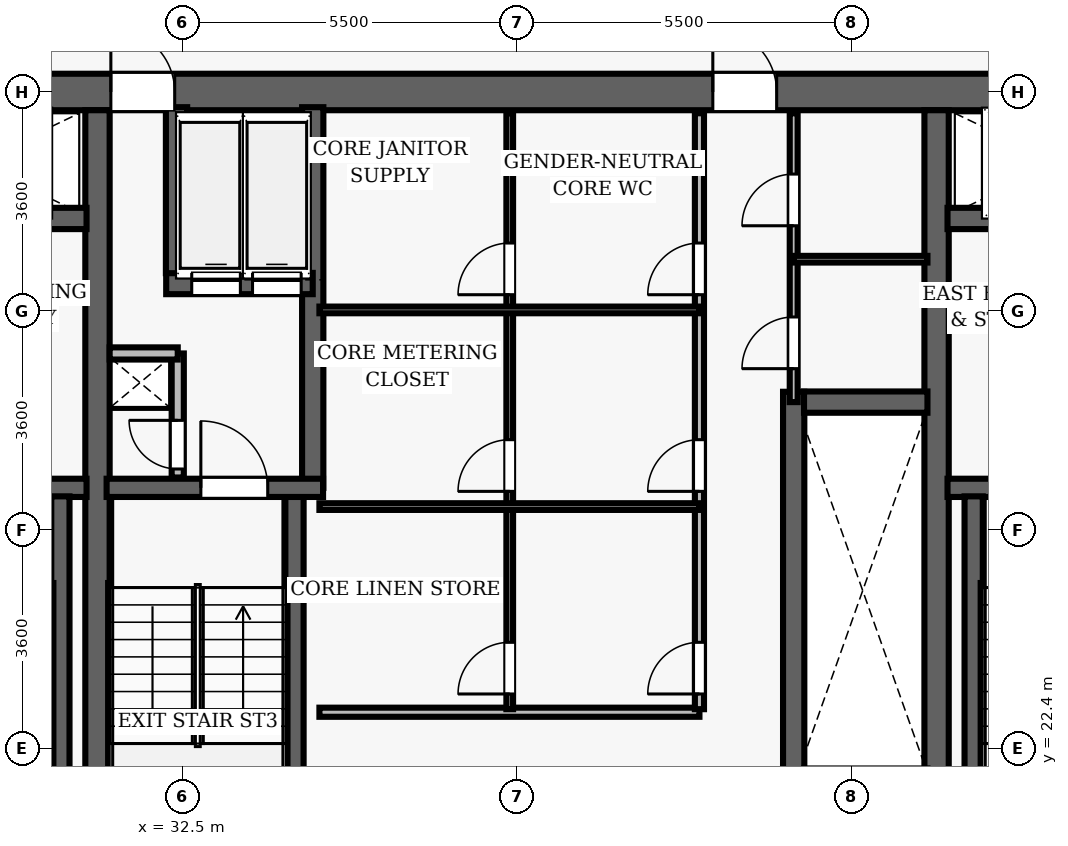
"""IFC4 building model, lengths in metres.
Left out: names, types, materials, properties, quantities, classifications, styles, units other than length and angle.
Written with IfcOpenShell. Run it as: python <this file> out.ifc"""

import sys

from ifc_helpers import new_model, si_unit, direction, frame, frame_2d, origin, place, context, subcontext, project, spatial, rectangle, extrude, element, fill, save


model = new_model("IFC4")
c1 = context("Model", 3, precision=1e-05, world=origin(), true_north=direction((0.0, 1.0)))
c2 = subcontext(c1, "Body", "Model", "MODEL_VIEW")
j1 = project(units=[si_unit("LENGTHUNIT", "METRE"), si_unit("PLANEANGLEUNIT", "RADIAN")], contexts=[c1])
p1 = place(None, origin())
s1 = spatial("IfcSite", under=j1, at=p1, CompositionType="ELEMENT")
p2 = place(p1, origin())
s2 = spatial("IfcBuilding", under=s1, at=p2, CompositionType="ELEMENT")
p3 = place(p2, frame((0.0, 0.0, 134.3)))
s3 = spatial("IfcBuildingStorey", under=s2, at=p3, CompositionType="ELEMENT", Elevation=134.3)
p4 = place(p3, frame((26.7, 33.2, 0.0), z_axis=(0.0, 0.0, 1.0), x_axis=(1.0, 0.0, 0.0)))
e1 = element("IfcWall", 1, at=p4, inside=s3, PredefinedType="SHEAR", context=c2, shape_type="SweptSolid", body=[
    extrude(rectangle(XDim=22.6, YDim=0.6, at=frame_2d((11.3, 0.0))), origin(), (0.0, 0.0, 1.0), 3.5),
])
p5 = place(p4, frame((4.62, 0.0, 0.0)))
e2 = element("IfcOpeningElement", 2, at=p5, cuts=e1, PredefinedType="OPENING", context=c2, shape_type="SweptSolid", body=[
    extrude(rectangle(XDim=1.05, YDim=2.15, at=frame_2d((0.525, 1.075))), frame((0.0, 0.31, 0.0), z_axis=(0.0, -1.0, 0.0), x_axis=(1.0, 0.0, 0.0)), (0.0, 0.0, 1.0), 0.62),
])
p6 = place(p4, frame((14.52, 0.0, 0.0)))
e3 = element("IfcOpeningElement", 3, at=p6, cuts=e1, PredefinedType="OPENING", context=c2, shape_type="SweptSolid", body=[
    extrude(rectangle(XDim=1.05, YDim=2.15, at=frame_2d((0.525, 1.075))), frame((0.0, 0.31, 0.0), z_axis=(0.0, -1.0, 0.0), x_axis=(1.0, 0.0, 0.0)), (0.0, 0.0, 1.0), 0.62),
])
for number, where, z_axis, x_axis in (
    (4, (31.1, 19.1, 0.0), (0.0, 0.0, 1.0), (0.0, 1.0, 0.0)),
    (5, (44.9, 19.1, 0.0), (0.0, 0.0, 1.0), (0.0, 1.0, 0.0)),
):
    element("IfcWall", number, at=place(p3, frame(where, z_axis=z_axis, x_axis=x_axis)), inside=s3, PredefinedType="SHEAR", context=c2, shape_type="SweptSolid", body=[
        extrude(rectangle(XDim=13.8, YDim=0.4, at=frame_2d((6.9, 0.0))), origin(), (0.0, 0.0, 1.0), 3.5),
    ])
p7 = place(p3, frame((27.25, 26.69, 0.0), z_axis=(0.0, 0.0, 1.0), x_axis=(1.0, 0.0, 0.0)))
e6 = element("IfcWall", 6, at=p7, inside=s3, PredefinedType="SHEAR", context=c2, shape_type="SweptSolid", body=[
    extrude(rectangle(XDim=3.67, YDim=0.3, at=frame_2d((1.835, 0.0))), origin(), (0.0, 0.0, 1.0), 3.5),
])
p8 = place(p7, frame((1.05, 0.0, 0.0)))
e7 = element("IfcOpeningElement", 7, at=p8, cuts=e6, PredefinedType="OPENING", context=c2, shape_type="SweptSolid", body=[
    extrude(rectangle(XDim=1.1, YDim=2.15, at=frame_2d((0.55, 1.075))), frame((0.0, 0.16, 0.0), z_axis=(0.0, -1.0, 0.0), x_axis=(1.0, 0.0, 0.0)), (0.0, 0.0, 1.0), 0.32),
])
p9 = place(p3, frame((30.49, 19.05, 0.0), z_axis=(0.0, 0.0, 1.0), x_axis=(0.0, 1.0, 0.0)))
e8 = element("IfcWall", 8, at=p9, inside=s3, PredefinedType="SHEAR", context=c2, shape_type="SweptSolid", body=[
    extrude(rectangle(XDim=7.5, YDim=0.3, at=frame_2d((3.75, 0.0))), origin(), (0.0, 0.0, 1.0), 3.5),
])
p10 = place(p3, frame((27.25, 31.12, 0.0), z_axis=(0.0, 0.0, 1.0), x_axis=(1.0, 0.0, 0.0)))
e9 = element("IfcWall", 9, at=p10, inside=s3, PredefinedType="SHEAR", context=c2, shape_type="SweptSolid", body=[
    extrude(rectangle(XDim=3.67, YDim=0.35, at=frame_2d((1.835, 0.0))), origin(), (0.0, 0.0, 1.0), 2.675),
])
p11 = place(p10, frame((1.25, 0.0, 0.0)))
e10 = element("IfcOpeningElement", 10, at=p11, cuts=e9, PredefinedType="OPENING", context=c2, shape_type="SweptSolid", body=[
    extrude(rectangle(XDim=1.1, YDim=2.15, at=frame_2d((0.55, 1.075))), frame((0.0, 0.185, 0.0), z_axis=(0.0, -1.0, 0.0), x_axis=(1.0, 0.0, 0.0)), (0.0, 0.0, 1.0), 0.37),
])
p12 = place(p3, frame((45.08, 26.69, 0.0), z_axis=(0.0, 0.0, 1.0), x_axis=(1.0, 0.0, 0.0)))
e11 = element("IfcWall", 11, at=p12, inside=s3, PredefinedType="SHEAR", context=c2, shape_type="SweptSolid", body=[
    extrude(rectangle(XDim=3.67, YDim=0.3, at=frame_2d((1.835, 0.0))), origin(), (0.0, 0.0, 1.0), 3.5),
])
p13 = place(p12, frame((1.05, 0.0, 0.0)))
e12 = element("IfcOpeningElement", 12, at=p13, cuts=e11, PredefinedType="OPENING", context=c2, shape_type="SweptSolid", body=[
    extrude(rectangle(XDim=1.1, YDim=2.15, at=frame_2d((0.55, 1.075))), frame((0.0, 0.16, 0.0), z_axis=(0.0, -1.0, 0.0), x_axis=(1.0, 0.0, 0.0)), (0.0, 0.0, 1.0), 0.32),
])
p14 = place(p3, frame((45.51, 19.05, 0.0), z_axis=(0.0, 0.0, 1.0), x_axis=(0.0, 1.0, 0.0)))
e13 = element("IfcWall", 13, at=p14, inside=s3, PredefinedType="SHEAR", context=c2, shape_type="SweptSolid", body=[
    extrude(rectangle(XDim=7.5, YDim=0.3, at=frame_2d((3.75, 0.0))), origin(), (0.0, 0.0, 1.0), 3.5),
])
p15 = place(p3, frame((45.08, 31.12, 0.0), z_axis=(0.0, 0.0, 1.0), x_axis=(1.0, 0.0, 0.0)))
e14 = element("IfcWall", 14, at=p15, inside=s3, PredefinedType="SHEAR", context=c2, shape_type="SweptSolid", body=[
    extrude(rectangle(XDim=3.67, YDim=0.35, at=frame_2d((1.835, 0.0))), origin(), (0.0, 0.0, 1.0), 2.675),
])
p16 = place(p15, frame((1.25, 0.0, 0.0)))
e15 = element("IfcOpeningElement", 15, at=p16, cuts=e14, PredefinedType="OPENING", context=c2, shape_type="SweptSolid", body=[
    extrude(rectangle(XDim=1.1, YDim=2.15, at=frame_2d((0.55, 1.075))), frame((0.0, 0.185, 0.0), z_axis=(0.0, -1.0, 0.0), x_axis=(1.0, 0.0, 0.0)), (0.0, 0.0, 1.0), 0.37),
])
p17 = place(p3, frame((34.34, 19.05, 0.0), z_axis=(0.0, 0.0, 1.0), x_axis=(0.0, 1.0, 0.0)))
e16 = element("IfcWall", 16, at=p17, inside=s3, PredefinedType="SHEAR", context=c2, shape_type="SweptSolid", body=[
    extrude(rectangle(XDim=7.5, YDim=0.3, at=frame_2d((3.75, 0.0))), origin(), (0.0, 0.0, 1.0), 3.5),
])
p18 = place(p3, frame((34.64, 26.69, 0.0), z_axis=(0.0, 0.0, 1.0), x_axis=(0.0, 1.0, 0.0)))
e17 = element("IfcWall", 17, at=p18, inside=s3, PredefinedType="SHEAR", context=c2, shape_type="SweptSolid", body=[
    extrude(rectangle(XDim=6.26, YDim=0.35, at=frame_2d((3.13, 0.0))), origin(), (0.0, 0.0, 1.0), 3.5),
])
p19 = place(p3, frame((31.25, 26.69, 0.0), z_axis=(0.0, 0.0, 1.0), x_axis=(1.0, 0.0, 0.0)))
e18 = element("IfcWall", 18, at=p19, inside=s3, PredefinedType="SHEAR", context=c2, shape_type="SweptSolid", body=[
    extrude(rectangle(XDim=3.56, YDim=0.3, at=frame_2d((1.78, 0.0))), origin(), (0.0, 0.0, 1.0), 3.5),
])
p20 = place(p19, frame((1.55, 0.0, 0.0)))
e19 = element("IfcOpeningElement", 19, at=p20, cuts=e18, PredefinedType="OPENING", context=c2, shape_type="SweptSolid", body=[
    extrude(rectangle(XDim=1.1, YDim=2.15, at=frame_2d((0.55, 1.075))), frame((0.0, 0.16, 0.0), z_axis=(0.0, -1.0, 0.0), x_axis=(1.0, 0.0, 0.0)), (0.0, 0.0, 1.0), 0.32),
])
p21 = place(p3, frame((32.23, 30.05, 0.0), z_axis=(0.0, 0.0, 1.0), x_axis=(1.0, 0.0, 0.0)))
e20 = element("IfcWall", 20, at=p21, inside=s3, PredefinedType="SHEAR", context=c2, shape_type="SweptSolid", body=[
    extrude(rectangle(XDim=2.41, YDim=0.35, at=frame_2d((1.205, 0.0))), origin(), (0.0, 0.0, 1.0), 2.675),
])
p22 = place(p21, frame((0.42, 0.0, 0.0)))
e21 = element("IfcOpeningElement", 21, at=p22, cuts=e20, PredefinedType="OPENING", context=c2, shape_type="SweptSolid", body=[
    extrude(rectangle(XDim=0.8, YDim=2.15, at=frame_2d((0.4, 1.075))), frame((0.0, 0.185, 0.0), z_axis=(0.0, -1.0, 0.0), x_axis=(1.0, 0.0, 0.0)), (0.0, 0.0, 1.0), 0.37),
])
p23 = place(p21, frame((1.42, 0.0, 0.0)))
e22 = element("IfcOpeningElement", 22, at=p23, cuts=e20, PredefinedType="OPENING", context=c2, shape_type="SweptSolid", body=[
    extrude(rectangle(XDim=0.8, YDim=2.15, at=frame_2d((0.4, 1.075))), frame((0.0, 0.185, 0.0), z_axis=(0.0, -1.0, 0.0), x_axis=(1.0, 0.0, 0.0)), (0.0, 0.0, 1.0), 0.37),
])
p24 = place(p3, frame((32.4, 30.22, 0.0), z_axis=(0.0, 0.0, 1.0), x_axis=(0.0, 1.0, 0.0)))
e23 = element("IfcWall", 23, at=p24, inside=s3, PredefinedType="SHEAR", context=c2, shape_type="SweptSolid", body=[
    extrude(rectangle(XDim=2.73, YDim=0.35, at=frame_2d((1.365, 0.0))), origin(), (0.0, 0.0, 1.0), 2.675),
])
p25 = place(p3, frame((32.42, 26.86, 0.0), z_axis=(0.0, 0.0, 1.0), x_axis=(0.0, 1.0, 0.0)))
e24 = element("IfcWall", 24, at=p25, inside=s3, PredefinedType="PARTITIONING", context=c2, shape_type="SweptSolid", body=[
    extrude(rectangle(XDim=2.04, YDim=0.2, at=frame_2d((1.02, 0.0))), origin(), (0.0, 0.0, 1.0), 2.675),
])
p26 = place(p25, frame((0.14, 0.0, 0.0)))
e25 = element("IfcOpeningElement", 25, at=p26, cuts=e24, PredefinedType="OPENING", context=c2, shape_type="SweptSolid", body=[
    extrude(rectangle(XDim=0.8, YDim=2.05, at=frame_2d((0.4, 1.025))), frame((0.0, 0.11, 0.0), z_axis=(0.0, -1.0, 0.0), x_axis=(1.0, 0.0, 0.0)), (0.0, 0.0, 1.0), 0.22),
])
p27 = place(p3, frame((31.3, 28.9, 0.0), z_axis=(0.0, 0.0, 1.0), x_axis=(1.0, 0.0, 0.0)))
e26 = element("IfcWall", 26, at=p27, inside=s3, PredefinedType="PARTITIONING", context=c2, shape_type="SweptSolid", body=[
    extrude(rectangle(XDim=1.12, YDim=0.2, at=frame_2d((0.56, 0.0))), origin(), (0.0, 0.0, 1.0), 2.675),
])
p28 = place(p3, frame((42.55, 21.73, 0.0), z_axis=(0.0, 0.0, 1.0), x_axis=(0.0, 1.0, 0.0)))
e27 = element("IfcWall", 27, at=p28, inside=s3, PredefinedType="SHEAR", context=c2, shape_type="SweptSolid", body=[
    extrude(rectangle(XDim=6.54, YDim=0.35, at=frame_2d((3.27, 0.0))), origin(), (0.0, 0.0, 1.0), 2.675),
])
p29 = place(p3, frame((42.72, 28.1, 0.0), z_axis=(0.0, 0.0, 1.0), x_axis=(1.0, 0.0, 0.0)))
e28 = element("IfcWall", 28, at=p29, inside=s3, PredefinedType="SHEAR", context=c2, shape_type="SweptSolid", body=[
    extrude(rectangle(XDim=2.03, YDim=0.35, at=frame_2d((1.015, 0.0))), origin(), (0.0, 0.0, 1.0), 2.675),
])
p30 = place(p3, frame((34.75, 23.0, 0.0), z_axis=(0.0, 0.0, 1.0), x_axis=(1.0, 0.0, 0.0)))
e29 = element("IfcWall", 29, at=p30, inside=s3, PredefinedType="PARTITIONING", context=c2, shape_type="SweptSolid", body=[
    extrude(rectangle(XDim=6.25, YDim=0.15, at=frame_2d((3.125, 0.0))), origin(), (0.0, 0.0, 1.0), 2.675),
])
p31 = place(p3, frame((41.0, 23.05, 0.0), z_axis=(0.0, 0.0, 1.0), x_axis=(0.0, 1.0, 0.0)))
e30 = element("IfcWall", 30, at=p31, inside=s3, PredefinedType="PARTITIONING", context=c2, shape_type="SweptSolid", body=[
    extrude(rectangle(XDim=9.8, YDim=0.15, at=frame_2d((4.9, 0.0))), origin(), (0.0, 0.0, 1.0), 2.675),
])
p32 = place(p31, frame((0.25, 0.0, 0.0)))
e31 = element("IfcOpeningElement", 31, at=p32, cuts=e30, PredefinedType="OPENING", context=c2, shape_type="SweptSolid", body=[
    extrude(rectangle(XDim=0.85, YDim=2.1, at=frame_2d((0.425, 1.05))), frame((0.0, 0.085, 0.0), z_axis=(0.0, -1.0, 0.0), x_axis=(1.0, 0.0, 0.0)), (0.0, 0.0, 1.0), 0.17),
])
p33 = place(p31, frame((3.582, 0.0, 0.0)))
e32 = element("IfcOpeningElement", 32, at=p33, cuts=e30, PredefinedType="OPENING", context=c2, shape_type="SweptSolid", body=[
    extrude(rectangle(XDim=0.85, YDim=2.1, at=frame_2d((0.425, 1.05))), frame((0.0, 0.085, 0.0), z_axis=(0.0, -1.0, 0.0), x_axis=(1.0, 0.0, 0.0)), (0.0, 0.0, 1.0), 0.17),
])
p34 = place(p31, frame((6.816, 0.0, 0.0)))
e33 = element("IfcOpeningElement", 33, at=p34, cuts=e30, PredefinedType="OPENING", context=c2, shape_type="SweptSolid", body=[
    extrude(rectangle(XDim=0.85, YDim=2.1, at=frame_2d((0.425, 1.05))), frame((0.0, 0.085, 0.0), z_axis=(0.0, -1.0, 0.0), x_axis=(1.0, 0.0, 0.0)), (0.0, 0.0, 1.0), 0.17),
])
p35 = place(p3, frame((37.88, 23.05, 0.0), z_axis=(0.0, 0.0, 1.0), x_axis=(0.0, 1.0, 0.0)))
e34 = element("IfcWall", 34, at=p35, inside=s3, PredefinedType="PARTITIONING", context=c2, shape_type="SweptSolid", body=[
    extrude(rectangle(XDim=9.8, YDim=0.11, at=frame_2d((4.9, 0.0))), origin(), (0.0, 0.0, 1.0), 2.675),
])
p36 = place(p35, frame((0.25, 0.0, 0.0)))
e35 = element("IfcOpeningElement", 35, at=p36, cuts=e34, PredefinedType="OPENING", context=c2, shape_type="SweptSolid", body=[
    extrude(rectangle(XDim=0.85, YDim=2.1, at=frame_2d((0.425, 1.05))), frame((0.0, 0.065, 0.0), z_axis=(0.0, -1.0, 0.0), x_axis=(1.0, 0.0, 0.0)), (0.0, 0.0, 1.0), 0.13),
])
p37 = place(p35, frame((3.582, 0.0, 0.0)))
e36 = element("IfcOpeningElement", 36, at=p37, cuts=e34, PredefinedType="OPENING", context=c2, shape_type="SweptSolid", body=[
    extrude(rectangle(XDim=0.85, YDim=2.1, at=frame_2d((0.425, 1.05))), frame((0.0, 0.065, 0.0), z_axis=(0.0, -1.0, 0.0), x_axis=(1.0, 0.0, 0.0)), (0.0, 0.0, 1.0), 0.13),
])
p38 = place(p35, frame((6.816, 0.0, 0.0)))
e37 = element("IfcOpeningElement", 37, at=p38, cuts=e34, PredefinedType="OPENING", context=c2, shape_type="SweptSolid", body=[
    extrude(rectangle(XDim=0.85, YDim=2.1, at=frame_2d((0.425, 1.05))), frame((0.0, 0.065, 0.0), z_axis=(0.0, -1.0, 0.0), x_axis=(1.0, 0.0, 0.0)), (0.0, 0.0, 1.0), 0.13),
])
for number, where, z_axis, x_axis in (
    (38, (34.75, 26.382, 0.0), (0.0, 0.0, 1.0), (1.0, 0.0, 0.0)),
    (39, (34.75, 29.616, 0.0), (0.0, 0.0, 1.0), (1.0, 0.0, 0.0)),
):
    element("IfcWall", number, at=place(p3, frame(where, z_axis=z_axis, x_axis=x_axis)), inside=s3, PredefinedType="PARTITIONING", context=c2, shape_type="SweptSolid", body=[
        extrude(rectangle(XDim=6.25, YDim=0.11, at=frame_2d((3.125, 0.0))), origin(), (0.0, 0.0, 1.0), 2.675),
    ])
p39 = place(p3, frame((42.55, 28.1, 0.0), z_axis=(0.0, 0.0, 1.0), x_axis=(0.0, 1.0, 0.0)))
e40 = element("IfcWall", 40, at=p39, inside=s3, PredefinedType="PARTITIONING", context=c2, shape_type="SweptSolid", body=[
    extrude(rectangle(XDim=4.75, YDim=0.13, at=frame_2d((2.375, 0.0))), origin(), (0.0, 0.0, 1.0), 2.675),
])
p40 = place(p39, frame((0.55, 0.0, 0.0)))
e41 = element("IfcOpeningElement", 41, at=p40, cuts=e40, PredefinedType="OPENING", context=c2, shape_type="SweptSolid", body=[
    extrude(rectangle(XDim=0.85, YDim=2.1, at=frame_2d((0.425, 1.05))), frame((0.0, 0.075, 0.0), z_axis=(0.0, -1.0, 0.0), x_axis=(1.0, 0.0, 0.0)), (0.0, 0.0, 1.0), 0.15),
])
p41 = place(p39, frame((2.9, 0.0, 0.0)))
e42 = element("IfcOpeningElement", 42, at=p41, cuts=e40, PredefinedType="OPENING", context=c2, shape_type="SweptSolid", body=[
    extrude(rectangle(XDim=0.85, YDim=2.1, at=frame_2d((0.425, 1.05))), frame((0.0, 0.075, 0.0), z_axis=(0.0, -1.0, 0.0), x_axis=(1.0, 0.0, 0.0)), (0.0, 0.0, 1.0), 0.15),
])
p42 = place(p3, frame((42.55, 30.45, 0.0), z_axis=(0.0, 0.0, 1.0), x_axis=(1.0, 0.0, 0.0)))
e43 = element("IfcWall", 43, at=p42, inside=s3, PredefinedType="PARTITIONING", context=c2, shape_type="SweptSolid", body=[
    extrude(rectangle(XDim=2.2, YDim=0.11, at=frame_2d((1.1, 0.0))), origin(), (0.0, 0.0, 1.0), 2.675),
])
p43 = place(p20, origin())
e44 = element("IfcDoor", 44, at=p43, inside=s3, OperationType="SINGLE_SWING_LEFT", PredefinedType="DOOR", context=c2, shape_type="SweptSolid", body=[
    extrude(rectangle(XDim=1.1, YDim=2.15, at=frame_2d((0.55, 1.075))), frame((0.0, 0.025, 0.0), z_axis=(0.0, -1.0, 0.0), x_axis=(1.0, 0.0, 0.0)), (0.0, 0.0, 1.0), 0.05),
])
fill(e19, e44)
p44 = place(p26, origin())
e45 = element("IfcDoor", 45, at=p44, inside=s3, OperationType="SINGLE_SWING_RIGHT", PredefinedType="DOOR", context=c2, shape_type="SweptSolid", body=[
    extrude(rectangle(XDim=0.8, YDim=2.05, at=frame_2d((0.4, 1.025))), frame((0.0, 0.025, 0.0), z_axis=(0.0, -1.0, 0.0), x_axis=(1.0, 0.0, 0.0)), (0.0, 0.0, 1.0), 0.05),
])
fill(e25, e45)
p45 = place(p5, origin())
e46 = element("IfcDoor", 46, at=p45, inside=s3, OperationType="SINGLE_SWING_LEFT", PredefinedType="DOOR", context=c2, shape_type="SweptSolid", body=[
    extrude(rectangle(XDim=1.05, YDim=2.15, at=frame_2d((0.525, 1.075))), frame((0.0, 0.025, 0.0), z_axis=(0.0, -1.0, 0.0), x_axis=(1.0, 0.0, 0.0)), (0.0, 0.0, 1.0), 0.05),
])
fill(e2, e46)
p46 = place(p6, origin())
e47 = element("IfcDoor", 47, at=p46, inside=s3, OperationType="SINGLE_SWING_LEFT", PredefinedType="DOOR", context=c2, shape_type="SweptSolid", body=[
    extrude(rectangle(XDim=1.05, YDim=2.15, at=frame_2d((0.525, 1.075))), frame((0.0, 0.025, 0.0), z_axis=(0.0, -1.0, 0.0), x_axis=(1.0, 0.0, 0.0)), (0.0, 0.0, 1.0), 0.05),
])
fill(e3, e47)
p47 = place(p32, origin())
e48 = element("IfcDoor", 48, at=p47, inside=s3, OperationType="SINGLE_SWING_LEFT", PredefinedType="DOOR", context=c2, shape_type="SweptSolid", body=[
    extrude(rectangle(XDim=0.85, YDim=2.1, at=frame_2d((0.425, 1.05))), frame((0.0, 0.025, 0.0), z_axis=(0.0, -1.0, 0.0), x_axis=(1.0, 0.0, 0.0)), (0.0, 0.0, 1.0), 0.05),
])
fill(e31, e48)
p48 = place(p36, origin())
e49 = element("IfcDoor", 49, at=p48, inside=s3, OperationType="SINGLE_SWING_LEFT", PredefinedType="DOOR", context=c2, shape_type="SweptSolid", body=[
    extrude(rectangle(XDim=0.85, YDim=2.1, at=frame_2d((0.425, 1.05))), frame((0.0, 0.025, 0.0), z_axis=(0.0, -1.0, 0.0), x_axis=(1.0, 0.0, 0.0)), (0.0, 0.0, 1.0), 0.05),
])
fill(e35, e49)
p49 = place(p33, origin())
e50 = element("IfcDoor", 50, at=p49, inside=s3, OperationType="SINGLE_SWING_LEFT", PredefinedType="DOOR", context=c2, shape_type="SweptSolid", body=[
    extrude(rectangle(XDim=0.85, YDim=2.1, at=frame_2d((0.425, 1.05))), frame((0.0, 0.025, 0.0), z_axis=(0.0, -1.0, 0.0), x_axis=(1.0, 0.0, 0.0)), (0.0, 0.0, 1.0), 0.05),
])
fill(e32, e50)
p50 = place(p37, origin())
e51 = element("IfcDoor", 51, at=p50, inside=s3, OperationType="SINGLE_SWING_LEFT", PredefinedType="DOOR", context=c2, shape_type="SweptSolid", body=[
    extrude(rectangle(XDim=0.85, YDim=2.1, at=frame_2d((0.425, 1.05))), frame((0.0, 0.025, 0.0), z_axis=(0.0, -1.0, 0.0), x_axis=(1.0, 0.0, 0.0)), (0.0, 0.0, 1.0), 0.05),
])
fill(e36, e51)
p51 = place(p34, origin())
e52 = element("IfcDoor", 52, at=p51, inside=s3, OperationType="SINGLE_SWING_LEFT", PredefinedType="DOOR", context=c2, shape_type="SweptSolid", body=[
    extrude(rectangle(XDim=0.85, YDim=2.1, at=frame_2d((0.425, 1.05))), frame((0.0, 0.025, 0.0), z_axis=(0.0, -1.0, 0.0), x_axis=(1.0, 0.0, 0.0)), (0.0, 0.0, 1.0), 0.05),
])
fill(e33, e52)
p52 = place(p38, origin())
e53 = element("IfcDoor", 53, at=p52, inside=s3, OperationType="SINGLE_SWING_LEFT", PredefinedType="DOOR", context=c2, shape_type="SweptSolid", body=[
    extrude(rectangle(XDim=0.85, YDim=2.1, at=frame_2d((0.425, 1.05))), frame((0.0, 0.025, 0.0), z_axis=(0.0, -1.0, 0.0), x_axis=(1.0, 0.0, 0.0)), (0.0, 0.0, 1.0), 0.05),
])
fill(e37, e53)
p53 = place(p40, origin())
e54 = element("IfcDoor", 54, at=p53, inside=s3, OperationType="SINGLE_SWING_LEFT", PredefinedType="DOOR", context=c2, shape_type="SweptSolid", body=[
    extrude(rectangle(XDim=0.85, YDim=2.1, at=frame_2d((0.425, 1.05))), frame((0.0, 0.025, 0.0), z_axis=(0.0, -1.0, 0.0), x_axis=(1.0, 0.0, 0.0)), (0.0, 0.0, 1.0), 0.05),
])
fill(e41, e54)
p54 = place(p41, origin())
e55 = element("IfcDoor", 55, at=p54, inside=s3, OperationType="SINGLE_SWING_LEFT", PredefinedType="DOOR", context=c2, shape_type="SweptSolid", body=[
    extrude(rectangle(XDim=0.85, YDim=2.1, at=frame_2d((0.425, 1.05))), frame((0.0, 0.025, 0.0), z_axis=(0.0, -1.0, 0.0), x_axis=(1.0, 0.0, 0.0)), (0.0, 0.0, 1.0), 0.05),
])
fill(e42, e55)
p55 = place(p22, origin())
e56 = element("IfcDoor", 56, at=p55, inside=s3, OperationType="SLIDING_TO_LEFT", PredefinedType="DOOR", context=c2, shape_type="SweptSolid", body=[
    extrude(rectangle(XDim=0.8, YDim=2.15, at=frame_2d((0.4, 1.075))), frame((0.0, 0.025, 0.0), z_axis=(0.0, -1.0, 0.0), x_axis=(1.0, 0.0, 0.0)), (0.0, 0.0, 1.0), 0.05),
])
fill(e21, e56)
p56 = place(p23, origin())
e57 = element("IfcDoor", 57, at=p56, inside=s3, OperationType="SLIDING_TO_LEFT", PredefinedType="DOOR", context=c2, shape_type="SweptSolid", body=[
    extrude(rectangle(XDim=0.8, YDim=2.15, at=frame_2d((0.4, 1.075))), frame((0.0, 0.025, 0.0), z_axis=(0.0, -1.0, 0.0), x_axis=(1.0, 0.0, 0.0)), (0.0, 0.0, 1.0), 0.05),
])
fill(e22, e57)
save(model, sys.argv[1])
